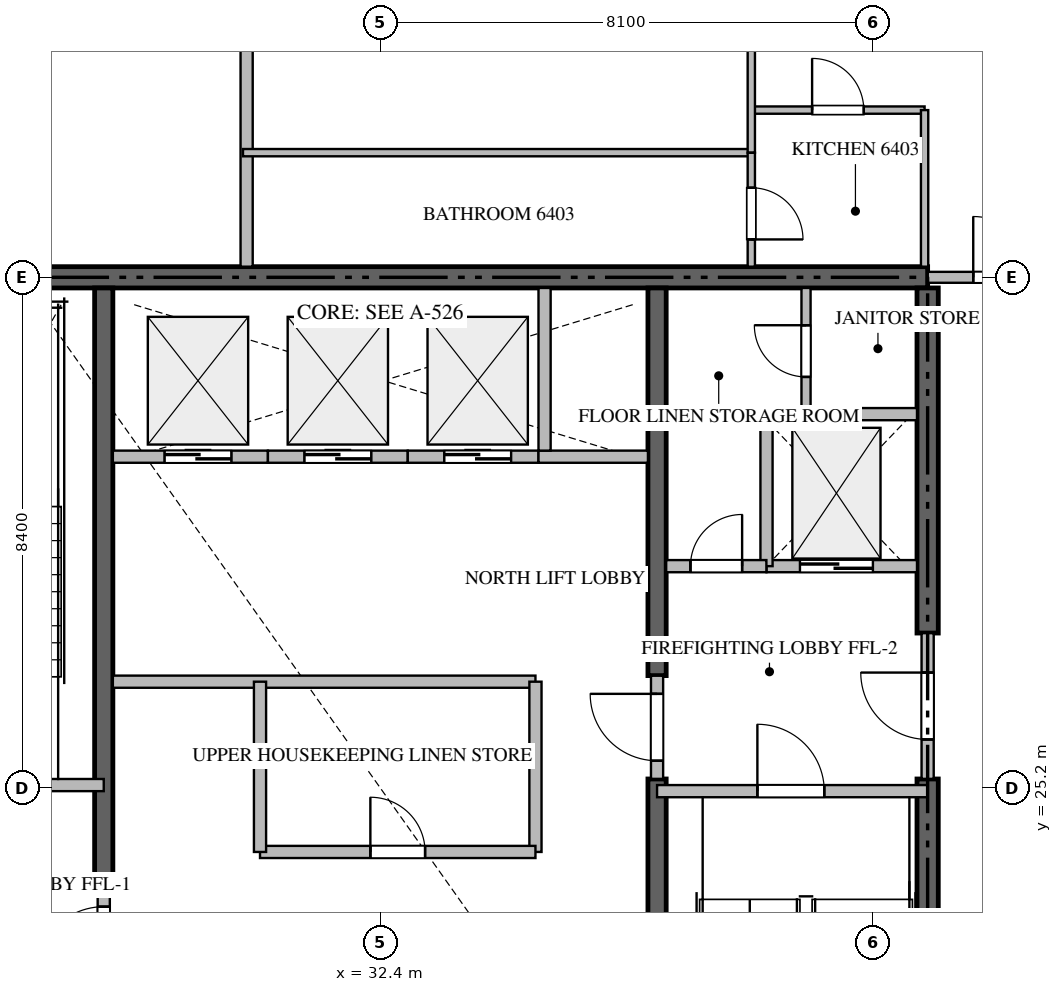
"""IFC4 building model, lengths in metres.
Left out: names, types, materials, properties, quantities, classifications, styles, units other than length and angle.
Written with IfcOpenShell. Run it as: python <this file> out.ifc"""

import sys

from ifc_helpers import new_model, si_unit, direction, frame, frame_2d, origin, place, context, subcontext, project, spatial, rectangle, extrude, source, transform, mapped, element, fill, save


model = new_model("IFC4")
c1 = context("Model", 3, precision=1e-05, world=origin(), true_north=direction((0.0, 1.0)))
c2 = subcontext(c1, "Body", "Model", "MODEL_VIEW")
j1 = project(units=[si_unit("LENGTHUNIT", "METRE"), si_unit("PLANEANGLEUNIT", "RADIAN")], contexts=[c1])
p1 = place(None, origin())
s1 = spatial("IfcSite", under=j1, at=p1, CompositionType="ELEMENT")
p2 = place(p1, origin())
s2 = spatial("IfcBuilding", under=s1, at=p2, CompositionType="ELEMENT")
p3 = place(p2, frame((0.0, 0.0, 256.65)))
s3 = spatial("IfcBuildingStorey", under=s2, at=p3, CompositionType="ELEMENT", Elevation=256.65)
p4 = place(p3, frame((41.4, 33.6, -0.26), z_axis=(0.0, 0.0, 1.0), x_axis=(-1.0, 0.0, 0.0)))
e1 = element("IfcWall", 1, at=p4, inside=s3, PredefinedType="SHEAR", context=c2, shape_type="SweptSolid", body=[
    extrude(rectangle(XDim=18.0, YDim=0.35, at=frame_2d((9.0, 0.0))), origin(), (0.0, 0.0, 1.0), 3.848),
])
p5 = place(p3, frame((41.4, 16.975, -0.26), z_axis=(0.0, 0.0, 1.0), x_axis=(0.0, 1.0, 0.0)))
e2 = element("IfcWall", 2, at=p5, inside=s3, PredefinedType="SHEAR", context=c2, shape_type="SweptSolid", body=[
    extrude(rectangle(XDim=8.375, YDim=0.35, at=frame_2d((4.188, 0.0))), origin(), (0.0, 0.0, 1.0), 3.848),
])
p6 = place(p3, frame((41.4, 27.75, -0.26), z_axis=(0.0, 0.0, 1.0), x_axis=(0.0, 1.0, 0.0)))
e3 = element("IfcWall", 3, at=p6, inside=s3, PredefinedType="SHEAR", context=c2, shape_type="SweptSolid", body=[
    extrude(rectangle(XDim=5.675, YDim=0.35, at=frame_2d((2.837, 0.0))), origin(), (0.0, 0.0, 1.0), 3.848),
])
p7 = place(p3, frame((27.85, 23.55, -0.26), z_axis=(0.0, 0.0, 1.0), x_axis=(0.0, 1.0, 0.0)))
e4 = element("IfcWall", 4, at=p7, inside=s3, PredefinedType="SHEAR", context=c2, shape_type="SweptSolid", body=[
    extrude(rectangle(XDim=9.875, YDim=0.3, at=frame_2d((4.938, 0.0))), origin(), (0.0, 0.0, 1.0), 3.848),
])
p8 = place(p3, frame((36.95, 16.975, -0.26), z_axis=(0.0, 0.0, 1.0), x_axis=(0.0, 1.0, 0.0)))
e5 = element("IfcWall", 5, at=p8, inside=s3, PredefinedType="SHEAR", context=c2, shape_type="SweptSolid", body=[
    extrude(rectangle(XDim=8.375, YDim=0.3, at=frame_2d((4.188, 0.0))), origin(), (0.0, 0.0, 1.0), 3.848),
])
p9 = place(p3, frame((36.95, 27.05, -0.26), z_axis=(0.0, 0.0, 1.0), x_axis=(0.0, 1.0, 0.0)))
e6 = element("IfcWall", 6, at=p9, inside=s3, PredefinedType="SHEAR", context=c2, shape_type="SweptSolid", body=[
    extrude(rectangle(XDim=6.375, YDim=0.3, at=frame_2d((3.188, 0.0))), origin(), (0.0, 0.0, 1.0), 3.848),
])
p10 = place(p3, frame((23.4, 25.25, 0.0), z_axis=(0.0, 0.0, 1.0), x_axis=(1.0, 0.0, 0.0)))
e7 = element("IfcWall", 7, at=p10, inside=s3, PredefinedType="STANDARD", context=c2, shape_type="SweptSolid", body=[
    extrude(rectangle(XDim=4.45, YDim=0.2, at=frame_2d((2.225, 0.0))), origin(), (0.0, 0.0, 1.0), 3.59),
])
p11 = place(p10, frame((1.65, 0.0, 0.0)))
e8 = element("IfcOpeningElement", 8, at=p11, cuts=e7, PredefinedType="OPENING", context=c2, shape_type="SweptSolid", body=[
    extrude(rectangle(XDim=1.1, YDim=2.15, at=frame_2d((0.55, 1.075))), frame((0.0, 0.11, 0.0), z_axis=(0.0, -1.0, 0.0), x_axis=(1.0, 0.0, 0.0)), (0.0, 0.0, 1.0), 0.22),
])
p12 = place(p3, frame((36.95, 25.15, 0.0), z_axis=(0.0, 0.0, 1.0), x_axis=(1.0, 0.0, 0.0)))
e9 = element("IfcWall", 9, at=p12, inside=s3, PredefinedType="STANDARD", context=c2, shape_type="SweptSolid", body=[
    extrude(rectangle(XDim=4.45, YDim=0.2, at=frame_2d((2.225, 0.0))), origin(), (0.0, 0.0, 1.0), 3.59),
])
p13 = place(p12, frame((1.65, 0.0, 0.0)))
e10 = element("IfcOpeningElement", 10, at=p13, cuts=e9, PredefinedType="OPENING", context=c2, shape_type="SweptSolid", body=[
    extrude(rectangle(XDim=1.1, YDim=2.15, at=frame_2d((0.55, 1.075))), frame((0.0, 0.11, 0.0), z_axis=(0.0, -1.0, 0.0), x_axis=(1.0, 0.0, 0.0)), (0.0, 0.0, 1.0), 0.22),
])
p14 = place(p3, frame((38.75, 28.85, 0.0), z_axis=(0.0, 0.0, 1.0), x_axis=(1.0, 0.0, 0.0)))
e11 = element("IfcWall", 11, at=p14, inside=s3, PredefinedType="STANDARD", context=c2, shape_type="SweptSolid", body=[
    extrude(rectangle(XDim=2.475, YDim=0.2, at=frame_2d((1.238, 0.0))), origin(), (0.0, 0.0, 1.0), 3.59),
])
p15 = place(p14, frame((0.55, 0.0, 0.0)))
e12 = element("IfcOpeningElement", 12, at=p15, cuts=e11, PredefinedType="OPENING", context=c2, shape_type="SweptSolid", body=[
    extrude(rectangle(XDim=1.2, YDim=2.2, at=frame_2d((0.6, 1.1))), frame((0.0, 0.11, 0.0), z_axis=(0.0, -1.0, 0.0), x_axis=(1.0, 0.0, 0.0)), (0.0, 0.0, 1.0), 0.22),
])
p16 = place(p3, frame((28.0, 30.65, 0.0), z_axis=(0.0, 0.0, 1.0), x_axis=(1.0, 0.0, 0.0)))
e13 = element("IfcWall", 13, at=p16, inside=s3, PredefinedType="STANDARD", context=c2, shape_type="SweptSolid", body=[
    extrude(rectangle(XDim=2.55, YDim=0.2, at=frame_2d((1.275, 0.0))), origin(), (0.0, 0.0, 1.0), 3.59),
])
p17 = place(p16, frame((0.85, 0.0, 0.0)))
e14 = element("IfcOpeningElement", 14, at=p17, cuts=e13, PredefinedType="OPENING", context=c2, shape_type="SweptSolid", body=[
    extrude(rectangle(XDim=1.1, YDim=2.2, at=frame_2d((0.55, 1.1))), frame((0.0, 0.11, 0.0), z_axis=(0.0, -1.0, 0.0), x_axis=(1.0, 0.0, 0.0)), (0.0, 0.0, 1.0), 0.22),
])
p18 = place(p3, frame((30.55, 30.65, 0.0), z_axis=(0.0, 0.0, 1.0), x_axis=(1.0, 0.0, 0.0)))
e15 = element("IfcWall", 15, at=p18, inside=s3, PredefinedType="STANDARD", context=c2, shape_type="SweptSolid", body=[
    extrude(rectangle(XDim=2.3, YDim=0.2, at=frame_2d((1.15, 0.0))), origin(), (0.0, 0.0, 1.0), 3.59),
])
p19 = place(p18, frame((0.6, 0.0, 0.0)))
e16 = element("IfcOpeningElement", 16, at=p19, cuts=e15, PredefinedType="OPENING", context=c2, shape_type="SweptSolid", body=[
    extrude(rectangle(XDim=1.1, YDim=2.2, at=frame_2d((0.55, 1.1))), frame((0.0, 0.11, 0.0), z_axis=(0.0, -1.0, 0.0), x_axis=(1.0, 0.0, 0.0)), (0.0, 0.0, 1.0), 0.22),
])
p20 = place(p3, frame((32.85, 30.65, 0.0), z_axis=(0.0, 0.0, 1.0), x_axis=(1.0, 0.0, 0.0)))
e17 = element("IfcWall", 17, at=p20, inside=s3, PredefinedType="STANDARD", context=c2, shape_type="SweptSolid", body=[
    extrude(rectangle(XDim=2.15, YDim=0.2, at=frame_2d((1.075, 0.0))), origin(), (0.0, 0.0, 1.0), 3.59),
])
p21 = place(p20, frame((0.6, 0.0, 0.0)))
e18 = element("IfcOpeningElement", 18, at=p21, cuts=e17, PredefinedType="OPENING", context=c2, shape_type="SweptSolid", body=[
    extrude(rectangle(XDim=1.1, YDim=2.2, at=frame_2d((0.55, 1.1))), frame((0.0, 0.11, 0.0), z_axis=(0.0, -1.0, 0.0), x_axis=(1.0, 0.0, 0.0)), (0.0, 0.0, 1.0), 0.22),
])
p22 = place(p3, frame((35.0, 30.65, 0.0), z_axis=(0.0, 0.0, 1.0), x_axis=(1.0, 0.0, 0.0)))
e19 = element("IfcWall", 19, at=p22, inside=s3, PredefinedType="STANDARD", context=c2, shape_type="SweptSolid", body=[
    extrude(rectangle(XDim=1.8, YDim=0.2, at=frame_2d((0.9, 0.0))), origin(), (0.0, 0.0, 1.0), 3.59),
])
p23 = place(p3, frame((35.1, 30.75, 0.0), z_axis=(0.0, 0.0, 1.0), x_axis=(0.0, 1.0, 0.0)))
e20 = element("IfcWall", 20, at=p23, inside=s3, PredefinedType="STANDARD", context=c2, shape_type="SweptSolid", body=[
    extrude(rectangle(XDim=2.675, YDim=0.2, at=frame_2d((1.337, 0.0))), origin(), (0.0, 0.0, 1.0), 3.59),
])
p24 = place(p3, frame((38.75, 28.85, 0.0), z_axis=(0.0, 0.0, 1.0), x_axis=(0.0, 1.0, 0.0)))
e21 = element("IfcWall", 21, at=p24, inside=s3, PredefinedType="STANDARD", context=c2, shape_type="SweptSolid", body=[
    extrude(rectangle(XDim=2.5, YDim=0.2, at=frame_2d((1.25, 0.0))), origin(), (0.0, 0.0, 1.0), 3.59),
])
p25 = place(p3, frame((38.75, 31.35, 0.0), z_axis=(0.0, 0.0, 1.0), x_axis=(1.0, 0.0, 0.0)))
e22 = element("IfcWall", 22, at=p25, inside=s3, PredefinedType="STANDARD", context=c2, shape_type="SweptSolid", body=[
    extrude(rectangle(XDim=2.475, YDim=0.2, at=frame_2d((1.238, 0.0))), origin(), (0.0, 0.0, 1.0), 3.59),
])
p26 = place(p3, frame((37.1, 28.85, 0.0), z_axis=(0.0, 0.0, 1.0), x_axis=(1.0, 0.0, 0.0)))
e23 = element("IfcWall", 23, at=p26, inside=s3, PredefinedType="STANDARD", context=c2, shape_type="SweptSolid", body=[
    extrude(rectangle(XDim=1.648, YDim=0.2, at=frame_2d((0.824, 0.0))), origin(), (0.0, 0.0, 1.0), 3.59),
])
p27 = place(p26, frame((0.399, 0.0, 0.0)))
e24 = element("IfcOpeningElement", 24, at=p27, cuts=e23, PredefinedType="OPENING", context=c2, shape_type="SweptSolid", body=[
    extrude(rectangle(XDim=0.85, YDim=2.1, at=frame_2d((0.425, 1.05))), frame((0.0, 0.11, 0.0), z_axis=(0.0, -1.0, 0.0), x_axis=(1.0, 0.0, 0.0)), (0.0, 0.0, 1.0), 0.22),
])
p28 = place(p3, frame((41.4, 25.352, 0.0), z_axis=(0.0, 0.0, 1.0), x_axis=(0.0, 1.0, 0.0)))
e25 = element("IfcWall", 25, at=p28, inside=s3, PredefinedType="STANDARD", context=c2, shape_type="SweptSolid", body=[
    extrude(rectangle(XDim=2.396, YDim=0.2, at=frame_2d((1.198, 0.0))), origin(), (0.0, 0.0, 1.0), 3.59),
])
p29 = place(p28, frame((0.648, 0.0, 0.0)))
e26 = element("IfcOpeningElement", 26, at=p29, cuts=e25, PredefinedType="OPENING", context=c2, shape_type="SweptSolid", body=[
    extrude(rectangle(XDim=1.1, YDim=2.15, at=frame_2d((0.55, 1.075))), frame((0.0, 0.11, 0.0), z_axis=(0.0, -1.0, 0.0), x_axis=(1.0, 0.0, 0.0)), (0.0, 0.0, 1.0), 0.22),
])
p30 = place(p3, frame((27.85, 21.852, 0.0), z_axis=(0.0, 0.0, 1.0), x_axis=(0.0, 1.0, 0.0)))
e27 = element("IfcWall", 27, at=p30, inside=s3, PredefinedType="STANDARD", context=c2, shape_type="SweptSolid", body=[
    extrude(rectangle(XDim=1.696, YDim=0.2, at=frame_2d((0.848, 0.0))), origin(), (0.0, 0.0, 1.0), 3.59),
])
p31 = place(p30, frame((0.298, 0.0, 0.0)))
e28 = element("IfcOpeningElement", 28, at=p31, cuts=e27, PredefinedType="OPENING", context=c2, shape_type="SweptSolid", body=[
    extrude(rectangle(XDim=1.1, YDim=2.15, at=frame_2d((0.55, 1.075))), frame((0.0, 0.11, 0.0), z_axis=(0.0, -1.0, 0.0), x_axis=(1.0, 0.0, 0.0)), (0.0, 0.0, 1.0), 0.22),
])
p32 = place(p3, frame((36.95, 25.352, 0.0), z_axis=(0.0, 0.0, 1.0), x_axis=(0.0, 1.0, 0.0)))
e29 = element("IfcWall", 29, at=p32, inside=s3, PredefinedType="STANDARD", context=c2, shape_type="SweptSolid", body=[
    extrude(rectangle(XDim=1.696, YDim=0.2, at=frame_2d((0.848, 0.0))), origin(), (0.0, 0.0, 1.0), 3.59),
])
p33 = place(p32, frame((0.298, 0.0, 0.0)))
e30 = element("IfcOpeningElement", 30, at=p33, cuts=e29, PredefinedType="OPENING", context=c2, shape_type="SweptSolid", body=[
    extrude(rectangle(XDim=1.1, YDim=2.15, at=frame_2d((0.55, 1.075))), frame((0.0, 0.11, 0.0), z_axis=(0.0, -1.0, 0.0), x_axis=(1.0, 0.0, 0.0)), (0.0, 0.0, 1.0), 0.22),
])
p34 = place(p3, frame((39.4, 31.35, 0.0), z_axis=(0.0, 0.0, 1.0), x_axis=(0.0, 1.0, 0.0)))
e31 = element("IfcWall", 31, at=p34, inside=s3, PredefinedType="PARTITIONING", context=c2, shape_type="SweptSolid", body=[
    extrude(rectangle(XDim=2.075, YDim=0.15, at=frame_2d((1.038, 0.0))), origin(), (0.0, 0.0, 1.0), 3.59),
])
p35 = place(p34, frame((0.612, 0.0, 0.0)))
e32 = element("IfcOpeningElement", 32, at=p35, cuts=e31, PredefinedType="OPENING", context=c2, shape_type="SweptSolid", body=[
    extrude(rectangle(XDim=0.85, YDim=2.1, at=frame_2d((0.425, 1.05))), frame((0.0, 0.085, 0.0), z_axis=(0.0, -1.0, 0.0), x_axis=(1.0, 0.0, 0.0)), (0.0, 0.0, 1.0), 0.17),
])
p36 = place(p3, frame((28.0, 26.95, 0.0), z_axis=(0.0, 0.0, 1.0), x_axis=(1.0, 0.0, 0.0)))
e33 = element("IfcWall", 33, at=p36, inside=s3, PredefinedType="STANDARD", context=c2, shape_type="SweptSolid", body=[
    extrude(rectangle(XDim=6.95, YDim=0.2, at=frame_2d((3.475, 0.0))), origin(), (0.0, 0.0, 1.0), 3.59),
])
p37 = place(p3, frame((34.95, 24.15, 0.0), z_axis=(0.0, 0.0, 1.0), x_axis=(0.0, 1.0, 0.0)))
e34 = element("IfcWall", 34, at=p37, inside=s3, PredefinedType="STANDARD", context=c2, shape_type="SweptSolid", body=[
    extrude(rectangle(XDim=2.8, YDim=0.2, at=frame_2d((1.4, 0.0))), origin(), (0.0, 0.0, 1.0), 3.59),
])
p38 = place(p3, frame((30.42, 24.15, 0.0), z_axis=(0.0, 0.0, 1.0), x_axis=(1.0, 0.0, 0.0)))
e35 = element("IfcWall", 35, at=p38, inside=s3, PredefinedType="STANDARD", context=c2, shape_type="SweptSolid", body=[
    extrude(rectangle(XDim=4.53, YDim=0.2, at=frame_2d((2.265, 0.0))), origin(), (0.0, 0.0, 1.0), 3.59),
])
p39 = place(p38, frame((1.815, 0.0, 0.0)))
e36 = element("IfcOpeningElement", 36, at=p39, cuts=e35, PredefinedType="OPENING", context=c2, shape_type="SweptSolid", body=[
    extrude(rectangle(XDim=0.9, YDim=2.1, at=frame_2d((0.45, 1.05))), frame((0.0, 0.11, 0.0), z_axis=(0.0, -1.0, 0.0), x_axis=(1.0, 0.0, 0.0)), (0.0, 0.0, 1.0), 0.22),
])
p40 = place(p3, frame((30.42, 24.15, 0.0), z_axis=(0.0, 0.0, 1.0), x_axis=(0.0, 1.0, 0.0)))
e37 = element("IfcWall", 37, at=p40, inside=s3, PredefinedType="STANDARD", context=c2, shape_type="SweptSolid", body=[
    extrude(rectangle(XDim=2.8, YDim=0.2, at=frame_2d((1.4, 0.0))), origin(), (0.0, 0.0, 1.0), 3.59),
])
p41 = place(p3, frame((30.2, 33.775, 0.0), z_axis=(0.0, 0.0, 1.0), x_axis=(0.0, 1.0, 0.0)))
e38 = element("IfcWall", 38, at=p41, inside=s3, PredefinedType="PARTITIONING", context=c2, shape_type="SweptSolid", body=[
    extrude(rectangle(XDim=15.343, YDim=0.2, at=frame_2d((7.671, 0.0))), origin(), (0.0, 0.0, 1.0), 3.59),
])
p42 = place(p3, frame((41.402, 33.6, 0.0), z_axis=(0.0, 0.0, 1.0), x_axis=(1.0, 0.0, 0.0)))
e39 = element("IfcWall", 39, at=p42, inside=s3, PredefinedType="PARTITIONING", context=c2, shape_type="SweptSolid", body=[
    extrude(rectangle(XDim=2.496, YDim=0.18, at=frame_2d((1.248, 0.0))), origin(), (0.0, 0.0, 1.0), 3.59),
])
p43 = place(p42, frame((0.748, 0.0, 0.0)))
e40 = element("IfcOpeningElement", 40, at=p43, cuts=e39, PredefinedType="OPENING", context=c2, shape_type="SweptSolid", body=[
    extrude(rectangle(XDim=1.0, YDim=2.15, at=frame_2d((0.5, 1.075))), frame((0.0, 0.1, 0.0), z_axis=(0.0, -1.0, 0.0), x_axis=(1.0, 0.0, 0.0)), (0.0, 0.0, 1.0), 0.2),
])
p44 = place(p3, frame((38.5, 36.35, 0.0), z_axis=(0.0, 0.0, 1.0), x_axis=(1.0, 0.0, 0.0)))
e41 = element("IfcWall", 41, at=p44, inside=s3, PredefinedType="PARTITIONING", context=c2, shape_type="SweptSolid", body=[
    extrude(rectangle(XDim=2.85, YDim=0.12, at=frame_2d((1.425, 0.0))), origin(), (0.0, 0.0, 1.0), 3.59),
])
p45 = place(p44, frame((1.0, 0.0, 0.0)))
e42 = element("IfcOpeningElement", 42, at=p45, cuts=e41, PredefinedType="OPENING", context=c2, shape_type="SweptSolid", body=[
    extrude(rectangle(XDim=0.85, YDim=2.1, at=frame_2d((0.425, 1.05))), frame((0.0, 0.07, 0.0), z_axis=(0.0, -1.0, 0.0), x_axis=(1.0, 0.0, 0.0)), (0.0, 0.0, 1.0), 0.14),
])
p46 = place(p3, frame((41.35, 36.35, 0.0), z_axis=(0.0, 0.0, 1.0), x_axis=(0.0, -1.0, 0.0)))
e43 = element("IfcWall", 43, at=p46, inside=s3, PredefinedType="PARTITIONING", context=c2, shape_type="SweptSolid", body=[
    extrude(rectangle(XDim=2.575, YDim=0.12, at=frame_2d((1.288, 0.0))), origin(), (0.0, 0.0, 1.0), 3.59),
])
p47 = place(p3, frame((30.14, 35.65, 0.0), z_axis=(0.0, 0.0, 1.0), x_axis=(1.0, 0.0, 0.0)))
e44 = element("IfcWall", 44, at=p47, inside=s3, PredefinedType="PARTITIONING", context=c2, shape_type="SweptSolid", body=[
    extrude(rectangle(XDim=8.36, YDim=0.12, at=frame_2d((4.18, 0.0))), origin(), (0.0, 0.0, 1.0), 3.59),
])
p48 = place(p3, frame((38.5, 43.98, 0.0), z_axis=(0.0, 0.0, 1.0), x_axis=(0.0, -1.0, 0.0)))
e45 = element("IfcWall", 45, at=p48, inside=s3, PredefinedType="PARTITIONING", context=c2, shape_type="SweptSolid", body=[
    extrude(rectangle(XDim=8.33, YDim=0.12, at=frame_2d((4.165, 0.0))), origin(), (0.0, 0.0, 1.0), 3.59),
])
p49 = place(p48, frame((3.74, 0.0, 0.0)))
e46 = element("IfcOpeningElement", 46, at=p49, cuts=e45, PredefinedType="OPENING", context=c2, shape_type="SweptSolid", body=[
    extrude(rectangle(XDim=0.85, YDim=2.1, at=frame_2d((0.425, 1.05))), frame((0.0, 0.07, 0.0), z_axis=(0.0, -1.0, 0.0), x_axis=(1.0, 0.0, 0.0)), (0.0, 0.0, 1.0), 0.14),
])
p50 = place(p3, frame((38.5, 35.648, 0.0), z_axis=(0.0, 0.0, 1.0), x_axis=(0.0, -1.0, 0.0)))
e47 = element("IfcWall", 47, at=p50, inside=s3, PredefinedType="PARTITIONING", context=c2, shape_type="SweptSolid", body=[
    extrude(rectangle(XDim=1.873, YDim=0.12, at=frame_2d((0.937, 0.0))), origin(), (0.0, 0.0, 1.0), 3.59),
])
p51 = place(p50, frame((0.575, 0.0, 0.0)))
e48 = element("IfcOpeningElement", 48, at=p51, cuts=e47, PredefinedType="OPENING", context=c2, shape_type="SweptSolid", body=[
    extrude(rectangle(XDim=0.85, YDim=2.1, at=frame_2d((0.425, 1.05))), frame((0.0, 0.07, 0.0), z_axis=(0.0, -1.0, 0.0), x_axis=(1.0, 0.0, 0.0)), (0.0, 0.0, 1.0), 0.14),
])
m1 = source(origin(), c2, "Body", "SweptSolid", [
    extrude(rectangle(XDim=1.1, YDim=2.15, at=frame_2d((0.55, 1.075))), frame((0.0, 0.025, 0.0), z_axis=(0.0, -1.0, 0.0), x_axis=(1.0, 0.0, 0.0)), (0.0, 0.0, 1.0), 0.05),
])
p52 = place(p13, origin())
e49 = element("IfcDoor", 49, at=p52, inside=s3, OperationType="SINGLE_SWING_LEFT", PredefinedType="DOOR", context=c2, shape_type="MappedRepresentation", body=[
    mapped(m1, transform((0.0, 0.0, 0.0), scale=1.0)),
])
fill(e10, e49)
m2 = source(origin(), c2, "Body", "SweptSolid", [
    extrude(rectangle(XDim=1.2, YDim=2.2, at=frame_2d((0.6, 1.1))), frame((0.0, 0.025, 0.0), z_axis=(0.0, -1.0, 0.0), x_axis=(1.0, 0.0, 0.0)), (0.0, 0.0, 1.0), 0.05),
])
p53 = place(p15, origin())
e50 = element("IfcDoor", 50, at=p53, inside=s3, OperationType="DOUBLE_DOOR_SLIDING", PredefinedType="DOOR", context=c2, shape_type="MappedRepresentation", body=[
    mapped(m2, transform((0.0, 0.0, 0.0), scale=1.0)),
])
fill(e12, e50)
m3 = source(origin(), c2, "Body", "SweptSolid", [
    extrude(rectangle(XDim=1.1, YDim=2.2, at=frame_2d((0.55, 1.1))), frame((0.0, 0.025, 0.0), z_axis=(0.0, -1.0, 0.0), x_axis=(1.0, 0.0, 0.0)), (0.0, 0.0, 1.0), 0.05),
])
p54 = place(p17, origin())
e51 = element("IfcDoor", 51, at=p54, inside=s3, OperationType="DOUBLE_DOOR_SLIDING", PredefinedType="DOOR", context=c2, shape_type="MappedRepresentation", body=[
    mapped(m3, transform((0.0, 0.0, 0.0), scale=1.0)),
])
fill(e14, e51)
p55 = place(p19, origin())
e52 = element("IfcDoor", 52, at=p55, inside=s3, OperationType="DOUBLE_DOOR_SLIDING", PredefinedType="DOOR", context=c2, shape_type="MappedRepresentation", body=[
    mapped(m3, transform((0.0, 0.0, 0.0), scale=1.0)),
])
fill(e16, e52)
p56 = place(p21, origin())
e53 = element("IfcDoor", 53, at=p56, inside=s3, OperationType="DOUBLE_DOOR_SLIDING", PredefinedType="DOOR", context=c2, shape_type="MappedRepresentation", body=[
    mapped(m3, transform((0.0, 0.0, 0.0), scale=1.0)),
])
fill(e18, e53)
m4 = source(origin(), c2, "Body", "SweptSolid", [
    extrude(rectangle(XDim=0.85, YDim=2.1, at=frame_2d((0.425, 1.05))), frame((0.0, 0.025, 0.0), z_axis=(0.0, -1.0, 0.0), x_axis=(1.0, 0.0, 0.0)), (0.0, 0.0, 1.0), 0.05),
])
p57 = place(p27, origin())
e54 = element("IfcDoor", 54, at=p57, inside=s3, OperationType="SINGLE_SWING_RIGHT", PredefinedType="DOOR", context=c2, shape_type="MappedRepresentation", body=[
    mapped(m4, transform((0.0, 0.0, 0.0), scale=1.0)),
])
fill(e24, e54)
p58 = place(p29, origin())
e55 = element("IfcDoor", 55, at=p58, inside=s3, OperationType="SINGLE_SWING_RIGHT", PredefinedType="DOOR", context=c2, shape_type="MappedRepresentation", body=[
    mapped(m1, transform((0.0, 0.0, 0.0), scale=1.0)),
])
fill(e26, e55)
p59 = place(p31, origin())
e56 = element("IfcDoor", 56, at=p59, inside=s3, OperationType="SINGLE_SWING_LEFT", PredefinedType="DOOR", context=c2, shape_type="MappedRepresentation", body=[
    mapped(m1, transform((0.0, 0.0, 0.0), scale=1.0)),
])
fill(e28, e56)
p60 = place(p33, origin())
e57 = element("IfcDoor", 57, at=p60, inside=s3, OperationType="SINGLE_SWING_RIGHT", PredefinedType="DOOR", context=c2, shape_type="MappedRepresentation", body=[
    mapped(m1, transform((0.0, 0.0, 0.0), scale=1.0)),
])
fill(e30, e57)
p61 = place(p35, origin())
e58 = element("IfcDoor", 58, at=p61, inside=s3, OperationType="SINGLE_SWING_RIGHT", PredefinedType="DOOR", context=c2, shape_type="MappedRepresentation", body=[
    mapped(m4, transform((0.0, 0.0, 0.0), scale=1.0)),
])
fill(e32, e58)
m5 = source(origin(), c2, "Body", "SweptSolid", [
    extrude(rectangle(XDim=0.9, YDim=2.1, at=frame_2d((0.45, 1.05))), frame((0.0, 0.025, 0.0), z_axis=(0.0, -1.0, 0.0), x_axis=(1.0, 0.0, 0.0)), (0.0, 0.0, 1.0), 0.05),
])
p62 = place(p39, origin())
e59 = element("IfcDoor", 59, at=p62, inside=s3, OperationType="SINGLE_SWING_LEFT", PredefinedType="DOOR", context=c2, shape_type="MappedRepresentation", body=[
    mapped(m5, transform((0.0, 0.0, 0.0), scale=1.0)),
])
fill(e36, e59)
m6 = source(origin(), c2, "Body", "SweptSolid", [
    extrude(rectangle(XDim=1.0, YDim=2.15, at=frame_2d((0.5, 1.075))), frame((0.0, 0.025, 0.0), z_axis=(0.0, -1.0, 0.0), x_axis=(1.0, 0.0, 0.0)), (0.0, 0.0, 1.0), 0.05),
])
p63 = place(p43, origin())
e60 = element("IfcDoor", 60, at=p63, inside=s3, OperationType="SINGLE_SWING_LEFT", PredefinedType="DOOR", context=c2, shape_type="MappedRepresentation", body=[
    mapped(m6, transform((0.0, 0.0, 0.0), scale=1.0)),
])
fill(e40, e60)
p64 = place(p45, origin())
e61 = element("IfcDoor", 61, at=p64, inside=s3, OperationType="SINGLE_SWING_LEFT", PredefinedType="DOOR", context=c2, shape_type="MappedRepresentation", body=[
    mapped(m4, transform((0.0, 0.0, 0.0), scale=1.0)),
])
fill(e42, e61)
p65 = place(p51, origin())
e62 = element("IfcDoor", 62, at=p65, inside=s3, OperationType="SINGLE_SWING_RIGHT", PredefinedType="DOOR", context=c2, shape_type="MappedRepresentation", body=[
    mapped(m4, transform((0.0, 0.0, 0.0), scale=1.0)),
])
fill(e48, e62)
save(model, sys.argv[1])
